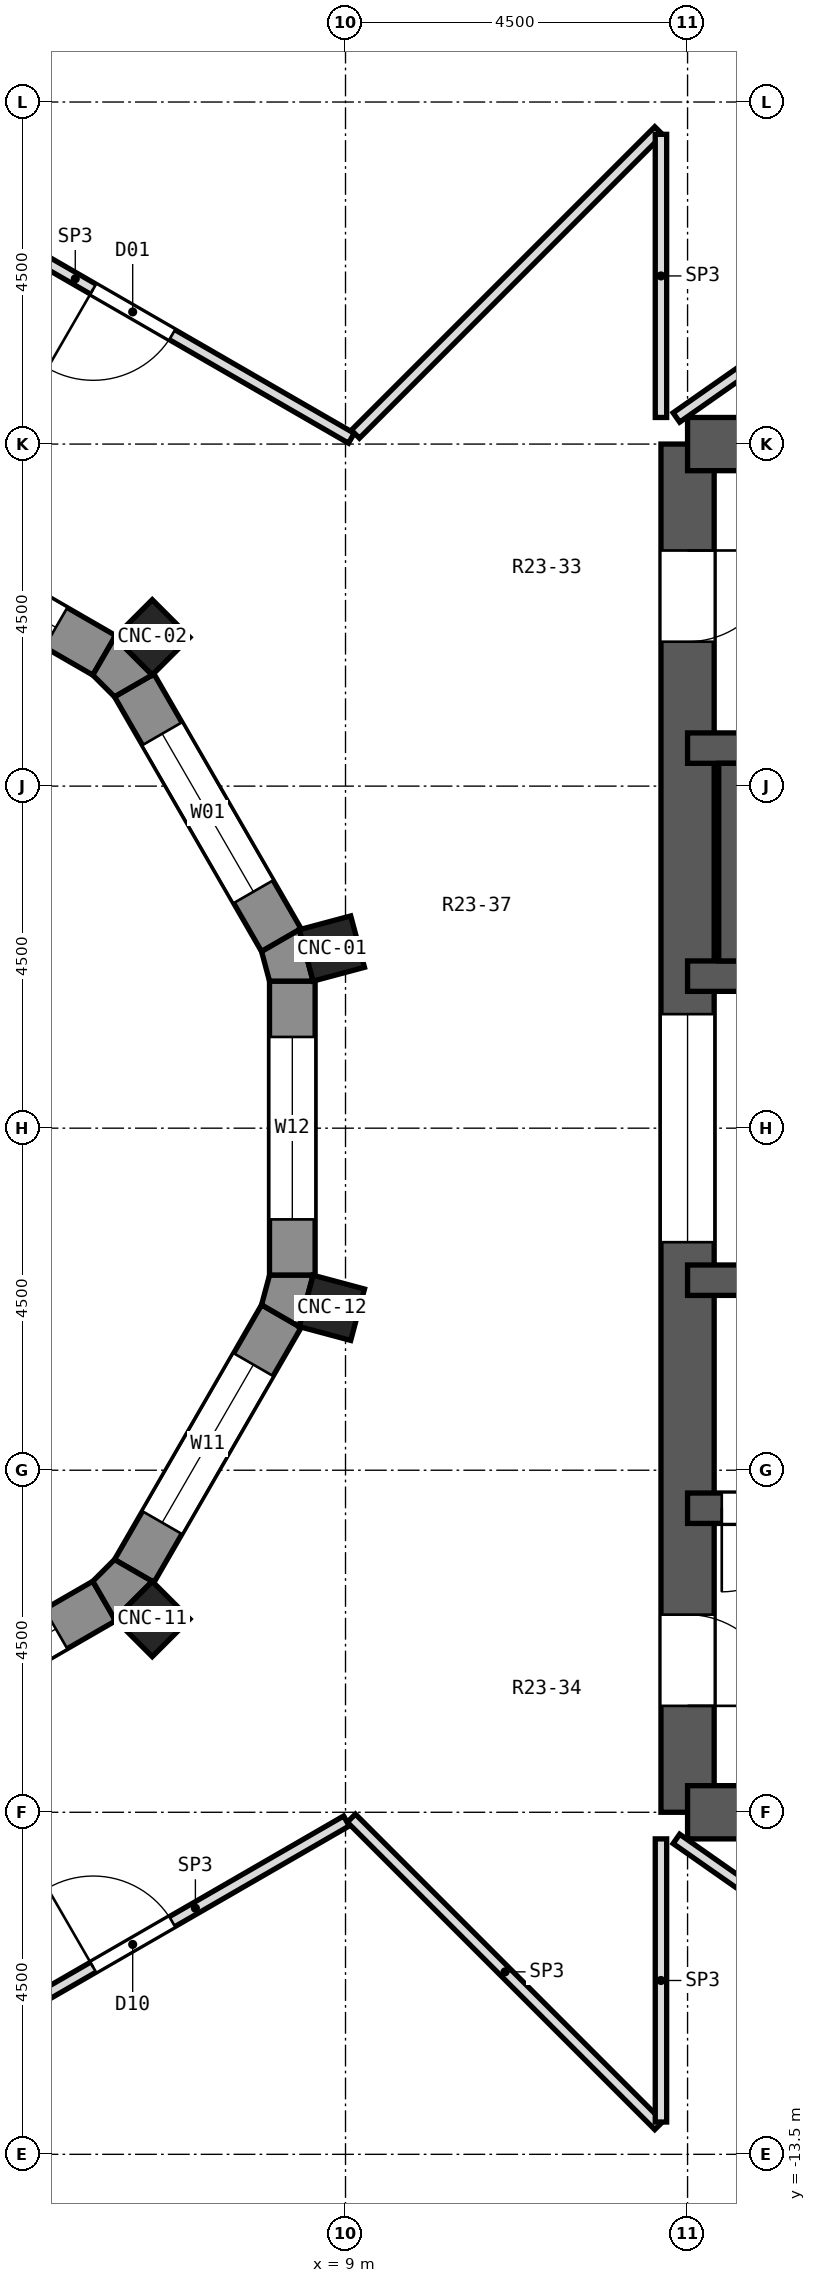
"""IFC4 building model, lengths in metres.
Left out: names, types, materials, properties, quantities, classifications, styles, units other than length and angle.
Written with IfcOpenShell. Run it as: python <this file> out.ifc"""

import sys

from ifc_helpers import new_model, si_unit, direction, frame, frame_2d, origin, origin_2d, place, context, subcontext, project, spatial, polyline, rectangle, outline, extrude, element, fill, save


model = new_model("IFC4")
c1 = context("Model", 3, precision=1e-05, world=origin(), true_north=direction((0.0, 1.0)))
c2 = subcontext(c1, "Body", "Model", "MODEL_VIEW")
j1 = project(units=[si_unit("LENGTHUNIT", "METRE"), si_unit("PLANEANGLEUNIT", "RADIAN")], contexts=[c1])
p1 = place(None, origin())
s1 = spatial("IfcSite", under=j1, at=p1, CompositionType="ELEMENT")
p2 = place(p1, origin())
s2 = spatial("IfcBuilding", under=s1, at=p2, CompositionType="ELEMENT")
p3 = place(p2, frame((0.0, 0.0, 151.3)))
s3 = spatial("IfcBuildingStorey", under=s2, at=p3, CompositionType="ELEMENT", Elevation=151.3)
for number, where, z_axis, x_axis in (
    (1, (8.821, 2.364, 0.0), (0.0, 0.0, 1.0), (0.966, 0.259, 0.0)),
    (2, (6.458, 6.458, 0.0), (0.0, 0.0, 1.0), (0.707, 0.707, 0.0)),
    (3, (6.458, -6.458, 0.0), (0.0, 0.0, 1.0), (0.707, -0.707, 0.0)),
    (4, (8.821, -2.364, 0.0), (0.0, 0.0, 1.0), (0.966, -0.259, 0.0)),
):
    element("IfcColumn", number, at=place(p3, frame(where, z_axis=z_axis, x_axis=x_axis)), inside=s3, PredefinedType="COLUMN", context=c2, shape_type="SweptSolid", body=[
        extrude(rectangle(XDim=0.7, YDim=0.7, at=origin_2d()), origin(), (0.0, 0.0, 1.0), 4.5),
    ])
p4 = place(p3, frame((13.5, -9.0, 0.0), z_axis=(0.0, 0.0, 1.0), x_axis=(0.0, 1.0, 0.0)))
e5 = element("IfcWall", 5, at=p4, inside=s3, PredefinedType="SHEAR", context=c2, shape_type="SweptSolid", body=[
    extrude(rectangle(XDim=18.0, YDim=0.7, at=frame_2d((9.0, 0.0))), origin(), (0.0, 0.0, 1.0), 4.5),
])
p5 = place(p4, frame((15.4, 0.0, 0.0)))
e6 = element("IfcOpeningElement", 6, at=p5, cuts=e5, PredefinedType="OPENING", context=c2, shape_type="SweptSolid", body=[
    extrude(rectangle(XDim=1.2, YDim=2.1, at=frame_2d((0.6, 1.05))), frame((0.0, 0.362, 0.0), z_axis=(0.0, -1.0, 0.0), x_axis=(1.0, 0.0, 0.0)), (0.0, 0.0, 1.0), 0.724),
])
p6 = place(p4, frame((1.4, 0.0, 0.0)))
e7 = element("IfcOpeningElement", 7, at=p6, cuts=e5, PredefinedType="OPENING", context=c2, shape_type="SweptSolid", body=[
    extrude(rectangle(XDim=1.2, YDim=2.1, at=frame_2d((0.6, 1.05))), frame((0.0, 0.362, 0.0), z_axis=(0.0, -1.0, 0.0), x_axis=(1.0, 0.0, 0.0)), (0.0, 0.0, 1.0), 0.724),
])
p7 = place(p4, frame((7.5, 0.0, 0.0)))
e8 = element("IfcOpeningElement", 8, at=p7, cuts=e5, PredefinedType="OPENING", context=c2, shape_type="SweptSolid", body=[
    extrude(rectangle(XDim=3.0, YDim=2.4, at=frame_2d((1.5, 1.2))), frame((0.0, 0.362, 0.0), z_axis=(0.0, -1.0, 0.0), x_axis=(1.0, 0.0, 0.0)), (0.0, 0.0, 1.0), 0.724),
])
for number, where, z_axis, x_axis in (
    (9, (13.5, 9.0, 0.0), (0.0, 0.0, 1.0), (1.0, 0.0, 0.0)),
    (10, (13.5, -9.0, 0.0), (0.0, 0.0, 1.0), (1.0, 0.0, 0.0)),
):
    element("IfcWall", number, at=place(p3, frame(where, z_axis=z_axis, x_axis=x_axis)), inside=s3, PredefinedType="SHEAR", context=c2, shape_type="SweptSolid", body=[
        extrude(rectangle(XDim=8.0, YDim=0.7, at=frame_2d((4.0, 0.0))), origin(), (0.0, 0.0, 1.0), 4.5),
    ])
p8 = place(p3, frame((13.5, 5.0, 0.0), z_axis=(0.0, 0.0, 1.0), x_axis=(1.0, 0.0, 0.0)))
e11 = element("IfcWall", 11, at=p8, inside=s3, PredefinedType="SHEAR", context=c2, shape_type="SweptSolid", body=[
    extrude(rectangle(XDim=8.0, YDim=0.4, at=frame_2d((4.0, 0.0))), origin(), (0.0, 0.0, 1.0), 4.5),
])
p9 = place(p3, frame((13.5, -5.0, 0.0), z_axis=(0.0, 0.0, 1.0), x_axis=(1.0, 0.0, 0.0)))
e12 = element("IfcWall", 12, at=p9, inside=s3, PredefinedType="SHEAR", context=c2, shape_type="SweptSolid", body=[
    extrude(rectangle(XDim=8.0, YDim=0.4, at=frame_2d((4.0, 0.0))), origin(), (0.0, 0.0, 1.0), 4.5),
])
p10 = place(p9, frame((0.45, 0.0, 0.0)))
e13 = element("IfcOpeningElement", 13, at=p10, cuts=e12, PredefinedType="OPENING", context=c2, shape_type="SweptSolid", body=[
    extrude(rectangle(XDim=1.1, YDim=2.1, at=frame_2d((0.55, 1.05))), frame((0.0, 0.212, 0.0), z_axis=(0.0, -1.0, 0.0), x_axis=(1.0, 0.0, 0.0)), (0.0, 0.0, 1.0), 0.424),
])
p11 = place(p3, frame((13.5, 2.0, 0.0), z_axis=(0.0, 0.0, 1.0), x_axis=(1.0, 0.0, 0.0)))
e14 = element("IfcWall", 14, at=p11, inside=s3, PredefinedType="SHEAR", context=c2, shape_type="SweptSolid", body=[
    extrude(rectangle(XDim=8.0, YDim=0.4, at=frame_2d((4.0, 0.0))), origin(), (0.0, 0.0, 1.0), 4.5),
])
p12 = place(p11, frame((5.37, 0.0, 0.0)))
e15 = element("IfcOpeningElement", 15, at=p12, cuts=e14, PredefinedType="OPENING", context=c2, shape_type="SweptSolid", body=[
    extrude(rectangle(XDim=1.1, YDim=2.1, at=frame_2d((0.55, 1.05))), frame((0.0, 0.212, 0.0), z_axis=(0.0, -1.0, 0.0), x_axis=(1.0, 0.0, 0.0)), (0.0, 0.0, 1.0), 0.424),
])
p13 = place(p3, frame((13.5, -2.0, 0.0), z_axis=(0.0, 0.0, 1.0), x_axis=(1.0, 0.0, 0.0)))
e16 = element("IfcWall", 16, at=p13, inside=s3, PredefinedType="SHEAR", context=c2, shape_type="SweptSolid", body=[
    extrude(rectangle(XDim=8.0, YDim=0.4, at=frame_2d((4.0, 0.0))), origin(), (0.0, 0.0, 1.0), 4.5),
])
p14 = place(p13, frame((1.19, 0.0, 0.0)))
e17 = element("IfcOpeningElement", 17, at=p14, cuts=e16, PredefinedType="OPENING", context=c2, shape_type="SweptSolid", body=[
    extrude(rectangle(XDim=1.0, YDim=2.1, at=frame_2d((0.5, 1.05))), frame((0.0, 0.212, 0.0), z_axis=(0.0, -1.0, 0.0), x_axis=(1.0, 0.0, 0.0)), (0.0, 0.0, 1.0), 0.424),
])
p15 = place(p13, frame((5.445, 0.0, 0.0)))
e18 = element("IfcOpeningElement", 18, at=p15, cuts=e16, PredefinedType="OPENING", context=c2, shape_type="SweptSolid", body=[
    extrude(rectangle(XDim=0.9, YDim=2.1, at=frame_2d((0.45, 1.05))), frame((0.0, 0.212, 0.0), z_axis=(0.0, -1.0, 0.0), x_axis=(1.0, 0.0, 0.0)), (0.0, 0.0, 1.0), 0.424),
])
p16 = place(p13, frame((6.615, 0.0, 0.0)))
e19 = element("IfcOpeningElement", 19, at=p16, cuts=e16, PredefinedType="OPENING", context=c2, shape_type="SweptSolid", body=[
    extrude(rectangle(XDim=0.9, YDim=2.1, at=frame_2d((0.45, 1.05))), frame((0.0, 0.212, 0.0), z_axis=(0.0, -1.0, 0.0), x_axis=(1.0, 0.0, 0.0)), (0.0, 0.0, 1.0), 0.424),
])
p17 = place(p3, frame((8.156, 2.474, 0.0), z_axis=(0.0, 0.0, 1.0), x_axis=(-0.500033728941, 0.866005929495, 0.0)))
e20 = element("IfcWall", 20, at=p17, inside=s3, PredefinedType="SOLIDWALL", context=c2, shape_type="SweptSolid", body=[
    extrude(rectangle(XDim=3.87, YDim=0.6, at=frame_2d((1.935, 0.0))), origin(), (0.0, 0.0, 1.0), 3.95),
])
p18 = place(p17, frame((0.735, 0.0, 1.5)))
e21 = element("IfcOpeningElement", 21, at=p18, cuts=e20, PredefinedType="OPENING", context=c2, shape_type="SweptSolid", body=[
    extrude(rectangle(XDim=2.4, YDim=2.0, at=frame_2d((1.2, 1.0))), frame((0.0, 0.312, 0.0), z_axis=(0.0, -1.0, 0.0), x_axis=(1.0, 0.0, 0.0)), (0.0, 0.0, 1.0), 0.624),
])
p19 = place(p3, frame((5.826, 6.22, 0.0), z_axis=(0.0, 0.0, 1.0), x_axis=(-0.866005929495, 0.500033728941, 0.0)))
e22 = element("IfcWall", 22, at=p19, inside=s3, PredefinedType="SOLIDWALL", context=c2, shape_type="SweptSolid", body=[
    extrude(rectangle(XDim=3.87, YDim=0.6, at=frame_2d((1.935, 0.0))), origin(), (0.0, 0.0, 1.0), 3.95),
])
p20 = place(p19, frame((0.735, 0.0, 1.5)))
e23 = element("IfcOpeningElement", 23, at=p20, cuts=e22, PredefinedType="OPENING", context=c2, shape_type="SweptSolid", body=[
    extrude(rectangle(XDim=2.4, YDim=2.0, at=frame_2d((1.2, 1.0))), frame((0.0, 0.312, 0.0), z_axis=(0.0, -1.0, 0.0), x_axis=(1.0, 0.0, 0.0)), (0.0, 0.0, 1.0), 0.624),
])
p21 = place(p3, frame((2.474, -8.156, 0.0), z_axis=(0.0, 0.0, 1.0), x_axis=(0.866005929495, 0.500033728941, 0.0)))
e24 = element("IfcWall", 24, at=p21, inside=s3, PredefinedType="SOLIDWALL", context=c2, shape_type="SweptSolid", body=[
    extrude(rectangle(XDim=3.87, YDim=0.6, at=frame_2d((1.935, 0.0))), origin(), (0.0, 0.0, 1.0), 3.95),
])
p22 = place(p21, frame((0.735, 0.0, 1.5)))
e25 = element("IfcOpeningElement", 25, at=p22, cuts=e24, PredefinedType="OPENING", context=c2, shape_type="SweptSolid", body=[
    extrude(rectangle(XDim=2.4, YDim=2.0, at=frame_2d((1.2, 1.0))), frame((0.0, 0.312, 0.0), z_axis=(0.0, -1.0, 0.0), x_axis=(1.0, 0.0, 0.0)), (0.0, 0.0, 1.0), 0.624),
])
p23 = place(p3, frame((6.22, -5.826, 0.0), z_axis=(0.0, 0.0, 1.0), x_axis=(0.500033728941, 0.866005929495, 0.0)))
e26 = element("IfcWall", 26, at=p23, inside=s3, PredefinedType="SOLIDWALL", context=c2, shape_type="SweptSolid", body=[
    extrude(rectangle(XDim=3.87, YDim=0.6, at=frame_2d((1.935, 0.0))), origin(), (0.0, 0.0, 1.0), 3.95),
])
p24 = place(p23, frame((0.735, 0.0, 1.5)))
e27 = element("IfcOpeningElement", 27, at=p24, cuts=e26, PredefinedType="OPENING", context=c2, shape_type="SweptSolid", body=[
    extrude(rectangle(XDim=2.4, YDim=2.0, at=frame_2d((1.2, 1.0))), frame((0.0, 0.312, 0.0), z_axis=(0.0, -1.0, 0.0), x_axis=(1.0, 0.0, 0.0)), (0.0, 0.0, 1.0), 0.624),
])
p25 = place(p3, frame((8.3, -1.935, 0.0), z_axis=(0.0, 0.0, 1.0), x_axis=(0.0, 1.0, 0.0)))
e28 = element("IfcWall", 28, at=p25, inside=s3, PredefinedType="SOLIDWALL", context=c2, shape_type="SweptSolid", body=[
    extrude(rectangle(XDim=3.87, YDim=0.6, at=frame_2d((1.935, 0.0))), origin(), (0.0, 0.0, 1.0), 3.95),
])
p26 = place(p25, frame((0.735, 0.0, 1.5)))
e29 = element("IfcOpeningElement", 29, at=p26, cuts=e28, PredefinedType="OPENING", context=c2, shape_type="SweptSolid", body=[
    extrude(rectangle(XDim=2.4, YDim=2.0, at=frame_2d((1.2, 1.0))), frame((0.0, 0.312, 0.0), z_axis=(0.0, -1.0, 0.0), x_axis=(1.0, 0.0, 0.0)), (0.0, 0.0, 1.0), 0.624),
])
p27 = place(p3, origin())
e30 = element("IfcWall", 30, at=p27, inside=s3, PredefinedType="SOLIDWALL", context=c2, shape_type="SweptSolid", body=[
    extrude(outline(polyline([(8.392, 2.611), (7.896, 2.324), (8.0, 1.935), (8.573, 1.935), (8.392, 2.611)])), origin(), (0.0, 0.0, 1.0), 3.95),
])
p28 = place(p3, origin())
e31 = element("IfcWall", 31, at=p28, inside=s3, PredefinedType="SOLIDWALL", context=c2, shape_type="SweptSolid", body=[
    extrude(outline(polyline([(5.962, 6.458), (5.676, 5.961), (5.961, 5.676), (6.458, 5.962), (5.962, 6.458)])), origin(), (0.0, 0.0, 1.0), 3.95),
])
p29 = place(p3, origin())
e32 = element("IfcWall", 32, at=p29, inside=s3, PredefinedType="SOLIDWALL", context=c2, shape_type="SweptSolid", body=[
    extrude(outline(polyline([(5.962, -6.458), (6.458, -5.962), (5.961, -5.676), (5.676, -5.961), (5.962, -6.458)])), origin(), (0.0, 0.0, 1.0), 3.95),
])
p30 = place(p3, origin())
e33 = element("IfcWall", 33, at=p30, inside=s3, PredefinedType="SOLIDWALL", context=c2, shape_type="SweptSolid", body=[
    extrude(outline(polyline([(8.573, -1.935), (8.0, -1.935), (7.896, -2.324), (8.392, -2.611), (8.573, -1.935)])), origin(), (0.0, 0.0, 1.0), 3.95),
])
p31 = place(p3, frame((3.323, -12.4, 0.0), z_axis=(0.0, 0.0, 1.0), x_axis=(0.258769040429, -0.965939223614, 0.0)))
e34 = element("IfcWall", 34, at=p31, inside=s3, PredefinedType="PARTITIONING", context=c2, shape_type="SweptSolid", body=[
    extrude(rectangle(XDim=10.862, YDim=0.15, at=frame_2d((5.431, 0.0))), origin(), (0.0, 0.0, 1.0), 3.95),
])
p32 = place(p3, frame((9.077, -9.077, 0.0), z_axis=(0.0, 0.0, 1.0), x_axis=(0.707106781187, -0.707106781187, 0.0)))
e35 = element("IfcWall", 35, at=p32, inside=s3, PredefinedType="PARTITIONING", context=c2, shape_type="SweptSolid", body=[
    extrude(rectangle(XDim=5.72, YDim=0.15, at=frame_2d((2.86, 0.0))), origin(), (0.0, 0.0, 1.0), 3.95),
])
p33 = place(p3, frame((13.353, -9.35, 0.0), z_axis=(0.0, 0.0, 1.0), x_axis=(0.819157506644, -0.573568635221, 0.0)))
e36 = element("IfcWall", 36, at=p33, inside=s3, PredefinedType="PARTITIONING", context=c2, shape_type="SweptSolid", body=[
    extrude(rectangle(XDim=7.399, YDim=0.15, at=frame_2d((3.7, 0.0))), origin(), (0.0, 0.0, 1.0), 3.95),
])
p34 = place(p3, frame((3.323, 12.4, 0.0), z_axis=(0.0, 0.0, 1.0), x_axis=(0.865961614908, -0.500110469302, 0.0)))
e37 = element("IfcWall", 37, at=p34, inside=s3, PredefinedType="PARTITIONING", context=c2, shape_type="SweptSolid", body=[
    extrude(rectangle(XDim=6.645, YDim=0.15, at=frame_2d((3.322, 0.0))), origin(), (0.0, 0.0, 1.0), 3.95),
])
p35 = place(p34, frame((2.722, 0.0, 0.0)))
e38 = element("IfcOpeningElement", 38, at=p35, cuts=e37, PredefinedType="OPENING", context=c2, shape_type="SweptSolid", body=[
    extrude(rectangle(XDim=1.2, YDim=2.1, at=frame_2d((0.6, 1.05))), frame((0.0, 0.087, 0.0), z_axis=(0.0, -1.0, 0.0), x_axis=(1.0, 0.0, 0.0)), (0.0, 0.0, 1.0), 0.174),
])
p36 = place(p3, frame((3.388, -12.363, 0.0), z_axis=(0.0, 0.0, 1.0), x_axis=(0.865967095912, 0.5001009786, 0.0)))
e39 = element("IfcWall", 39, at=p36, inside=s3, PredefinedType="PARTITIONING", context=c2, shape_type="SweptSolid", body=[
    extrude(rectangle(XDim=6.495, YDim=0.15, at=frame_2d((3.248, 0.0))), origin(), (0.0, 0.0, 1.0), 3.95),
])
p37 = place(p36, frame((2.647, 0.0, 0.0)))
e40 = element("IfcOpeningElement", 40, at=p37, cuts=e39, PredefinedType="OPENING", context=c2, shape_type="SweptSolid", body=[
    extrude(rectangle(XDim=1.2, YDim=2.1, at=frame_2d((0.6, 1.05))), frame((0.0, 0.087, 0.0), z_axis=(0.0, -1.0, 0.0), x_axis=(1.0, 0.0, 0.0)), (0.0, 0.0, 1.0), 0.174),
])
p38 = place(p3, frame((13.353, 9.35, 0.0), z_axis=(0.0, 0.0, 1.0), x_axis=(0.819157506644, 0.573568635221, 0.0)))
e41 = element("IfcWall", 41, at=p38, inside=s3, PredefinedType="PARTITIONING", context=c2, shape_type="SweptSolid", body=[
    extrude(rectangle(XDim=7.399, YDim=0.15, at=frame_2d((3.7, 0.0))), origin(), (0.0, 0.0, 1.0), 3.95),
])
p39 = place(p3, frame((9.13, 9.13, 0.0), z_axis=(0.0, 0.0, 1.0), x_axis=(0.707106781187, 0.707106781187, 0.0)))
e42 = element("IfcWall", 42, at=p39, inside=s3, PredefinedType="PARTITIONING", context=c2, shape_type="SweptSolid", body=[
    extrude(rectangle(XDim=5.645, YDim=0.15, at=frame_2d((2.823, 0.0))), origin(), (0.0, 0.0, 1.0), 3.95),
])
p40 = place(p3, frame((3.342, 12.472, 0.0), z_axis=(0.0, 0.0, 1.0), x_axis=(0.258802076295, 0.965930372908, 0.0)))
e43 = element("IfcWall", 43, at=p40, inside=s3, PredefinedType="PARTITIONING", context=c2, shape_type="SweptSolid", body=[
    extrude(rectangle(XDim=10.787, YDim=0.15, at=frame_2d((5.394, 0.0))), origin(), (0.0, 0.0, 1.0), 3.95),
])
for number, where, z_axis, x_axis in (
    (44, (13.15, -13.075, 0.0), (0.0, 0.0, 1.0), (0.0, 1.0, 0.0)),
    (45, (13.15, 9.35, 0.0), (0.0, 0.0, 1.0), (0.0, 1.0, 0.0)),
):
    element("IfcWall", number, at=place(p3, frame(where, z_axis=z_axis, x_axis=x_axis)), inside=s3, PredefinedType="PARTITIONING", context=c2, shape_type="SweptSolid", body=[
        extrude(rectangle(XDim=3.725, YDim=0.15, at=frame_2d((1.862, 0.0))), origin(), (0.0, 0.0, 1.0), 3.95),
    ])
p41 = place(p3, frame((13.91, 3.5, 0.0), z_axis=(0.0, 0.0, 1.0), x_axis=(1.0, 0.0, 0.0)))
e46 = element("IfcWall", 46, at=p41, inside=s3, PredefinedType="SOLIDWALL", context=c2, shape_type="SweptSolid", body=[
    extrude(rectangle(XDim=2.31, YDim=2.6, at=frame_2d((1.155, 0.0))), origin(), (0.0, 0.0, 1.0), 3.1),
])
p42 = place(p18, origin())
e47 = element("IfcWindow", 47, at=p42, inside=s3, PartitioningType="SINGLE_PANEL", PredefinedType="WINDOW", context=c2, shape_type="SweptSolid", body=[
    extrude(rectangle(XDim=2.4, YDim=2.0, at=frame_2d((1.2, 1.0))), frame((0.0, -0.12, 0.0), z_axis=(0.0, -1.0, 0.0), x_axis=(1.0, 0.0, 0.0)), (0.0, 0.0, 1.0), 0.06),
])
fill(e21, e47)
p43 = place(p20, origin())
e48 = element("IfcWindow", 48, at=p43, inside=s3, PartitioningType="SINGLE_PANEL", PredefinedType="WINDOW", context=c2, shape_type="SweptSolid", body=[
    extrude(rectangle(XDim=2.4, YDim=2.0, at=frame_2d((1.2, 1.0))), frame((0.0, -0.12, 0.0), z_axis=(0.0, -1.0, 0.0), x_axis=(1.0, 0.0, 0.0)), (0.0, 0.0, 1.0), 0.06),
])
fill(e23, e48)
p44 = place(p22, origin())
e49 = element("IfcWindow", 49, at=p44, inside=s3, PartitioningType="SINGLE_PANEL", PredefinedType="WINDOW", context=c2, shape_type="SweptSolid", body=[
    extrude(rectangle(XDim=2.4, YDim=2.0, at=frame_2d((1.2, 1.0))), frame((0.0, -0.12, 0.0), z_axis=(0.0, -1.0, 0.0), x_axis=(1.0, 0.0, 0.0)), (0.0, 0.0, 1.0), 0.06),
])
fill(e25, e49)
p45 = place(p24, origin())
e50 = element("IfcWindow", 50, at=p45, inside=s3, PartitioningType="SINGLE_PANEL", PredefinedType="WINDOW", context=c2, shape_type="SweptSolid", body=[
    extrude(rectangle(XDim=2.4, YDim=2.0, at=frame_2d((1.2, 1.0))), frame((0.0, -0.12, 0.0), z_axis=(0.0, -1.0, 0.0), x_axis=(1.0, 0.0, 0.0)), (0.0, 0.0, 1.0), 0.06),
])
fill(e27, e50)
p46 = place(p26, origin())
e51 = element("IfcWindow", 51, at=p46, inside=s3, PartitioningType="SINGLE_PANEL", PredefinedType="WINDOW", context=c2, shape_type="SweptSolid", body=[
    extrude(rectangle(XDim=2.4, YDim=2.0, at=frame_2d((1.2, 1.0))), frame((0.0, -0.12, 0.0), z_axis=(0.0, -1.0, 0.0), x_axis=(1.0, 0.0, 0.0)), (0.0, 0.0, 1.0), 0.06),
])
fill(e29, e51)
p47 = place(p35, frame((1.2, 0.0, 0.0), z_axis=(0.0, 0.0, 1.0), x_axis=(-1.0, 0.0, 0.0)))
e52 = element("IfcDoor", 52, at=p47, inside=s3, OperationType="SINGLE_SWING_RIGHT", PredefinedType="DOOR", context=c2, shape_type="SweptSolid", body=[
    extrude(rectangle(XDim=1.2, YDim=2.1, at=frame_2d((0.6, 1.05))), frame((0.0, 0.025, 0.0), z_axis=(0.0, -1.0, 0.0), x_axis=(1.0, 0.0, 0.0)), (0.0, 0.0, 1.0), 0.05),
])
fill(e38, e52)
p48 = place(p37, origin())
e53 = element("IfcDoor", 53, at=p48, inside=s3, OperationType="SINGLE_SWING_LEFT", PredefinedType="DOOR", context=c2, shape_type="SweptSolid", body=[
    extrude(rectangle(XDim=1.2, YDim=2.1, at=frame_2d((0.6, 1.05))), frame((0.0, 0.025, 0.0), z_axis=(0.0, -1.0, 0.0), x_axis=(1.0, 0.0, 0.0)), (0.0, 0.0, 1.0), 0.05),
])
fill(e40, e53)
p49 = place(p10, frame((1.1, 0.0, 0.0), z_axis=(0.0, 0.0, 1.0), x_axis=(-1.0, 0.0, 0.0)))
e54 = element("IfcDoor", 54, at=p49, inside=s3, OperationType="SINGLE_SWING_RIGHT", PredefinedType="DOOR", context=c2, shape_type="SweptSolid", body=[
    extrude(rectangle(XDim=1.1, YDim=2.1, at=frame_2d((0.55, 1.05))), frame((0.0, 0.025, 0.0), z_axis=(0.0, -1.0, 0.0), x_axis=(1.0, 0.0, 0.0)), (0.0, 0.0, 1.0), 0.05),
])
fill(e13, e54)
p50 = place(p5, frame((1.2, 0.0, 0.0), z_axis=(0.0, 0.0, 1.0), x_axis=(-1.0, 0.0, 0.0)))
e55 = element("IfcDoor", 55, at=p50, inside=s3, OperationType="SINGLE_SWING_LEFT", PredefinedType="DOOR", context=c2, shape_type="SweptSolid", body=[
    extrude(rectangle(XDim=1.2, YDim=2.1, at=frame_2d((0.6, 1.05))), frame((0.0, 0.025, 0.0), z_axis=(0.0, -1.0, 0.0), x_axis=(1.0, 0.0, 0.0)), (0.0, 0.0, 1.0), 0.05),
])
fill(e6, e55)
p51 = place(p6, frame((1.2, 0.0, 0.0), z_axis=(0.0, 0.0, 1.0), x_axis=(-1.0, 0.0, 0.0)))
e56 = element("IfcDoor", 56, at=p51, inside=s3, OperationType="SINGLE_SWING_RIGHT", PredefinedType="DOOR", context=c2, shape_type="SweptSolid", body=[
    extrude(rectangle(XDim=1.2, YDim=2.1, at=frame_2d((0.6, 1.05))), frame((0.0, 0.025, 0.0), z_axis=(0.0, -1.0, 0.0), x_axis=(1.0, 0.0, 0.0)), (0.0, 0.0, 1.0), 0.05),
])
fill(e7, e56)
p52 = place(p7, origin())
e57 = element("IfcDoor", 57, at=p52, inside=s3, OperationType="DOUBLE_DOOR_SLIDING", PredefinedType="DOOR", context=c2, shape_type="SweptSolid", body=[
    extrude(rectangle(XDim=3.0, YDim=2.4, at=frame_2d((1.5, 1.2))), frame((0.0, 0.025, 0.0), z_axis=(0.0, -1.0, 0.0), x_axis=(1.0, 0.0, 0.0)), (0.0, 0.0, 1.0), 0.05),
])
fill(e8, e57)
save(model, sys.argv[1])
